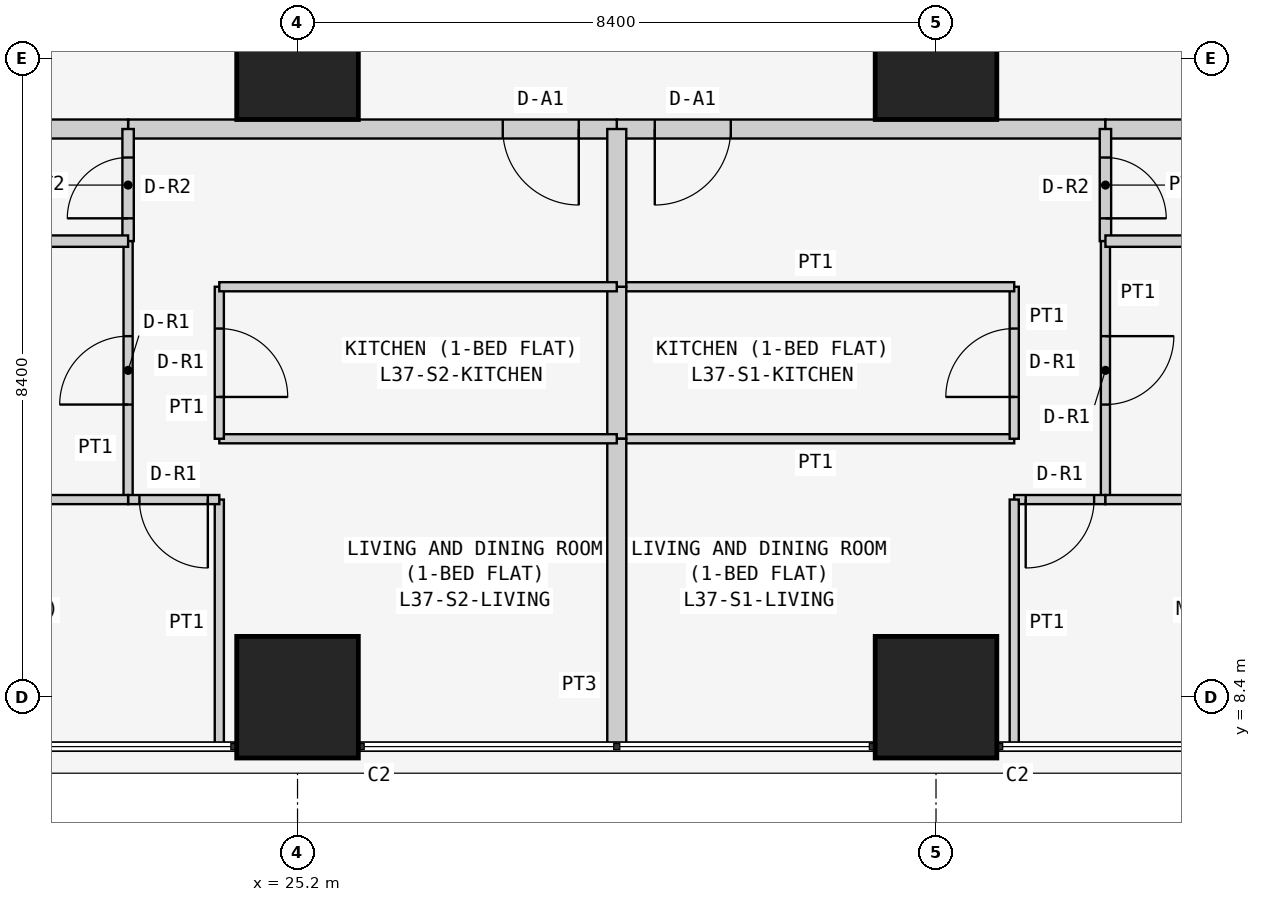
"""IFC4 building model, lengths in metres.
Left out: names, types, materials, properties, quantities, classifications, styles, units other than length and angle.
Written with IfcOpenShell. Run it as: python <this file> out.ifc"""

import sys

from ifc_helpers import new_model, si_unit, direction, frame, frame_2d, origin, origin_2d, place, context, subcontext, project, spatial, rectangle, extrude, element, fill, save


model = new_model("IFC4")
c1 = context("Model", 3, precision=1e-05, world=origin(), true_north=direction((0.0, 1.0)))
c2 = subcontext(c1, "Body", "Model", "MODEL_VIEW")
j1 = project(units=[si_unit("LENGTHUNIT", "METRE"), si_unit("PLANEANGLEUNIT", "RADIAN")], contexts=[c1])
p1 = place(None, origin())
s1 = spatial("IfcSite", under=j1, at=p1, CompositionType="ELEMENT")
p2 = place(p1, origin())
s2 = spatial("IfcBuilding", under=s1, at=p2, CompositionType="ELEMENT")
p3 = place(p2, frame((0.0, 0.0, 144.9)))
s3 = spatial("IfcBuildingStorey", under=s2, at=p3, CompositionType="ELEMENT", Elevation=144.9)
for number, where, z_axis, x_axis in (
    (1, (25.2, 8.4, 0.0), (0.0, 0.0, 1.0), (1.0, 0.0, 0.0)),
    (2, (25.2, 16.8, 0.0), (0.0, 0.0, 1.0), (1.0, 0.0, 0.0)),
    (3, (33.6, 8.4, 0.0), (0.0, 0.0, 1.0), (1.0, 0.0, 0.0)),
    (4, (33.6, 16.8, 0.0), (0.0, 0.0, 1.0), (1.0, 0.0, 0.0)),
):
    element("IfcColumn", number, at=place(p3, frame(where, z_axis=z_axis, x_axis=x_axis)), inside=s3, PredefinedType="COLUMN", context=c2, shape_type="SweptSolid", body=[
        extrude(rectangle(XDim=1.6, YDim=1.6, at=origin_2d()), origin(), (0.0, 0.0, 1.0), 3.6),
    ])
p4 = place(p3, frame((35.829, 15.875, 0.0), z_axis=(0.0, 0.0, 1.0), x_axis=(-1.0, 0.0, 0.0)))
e5 = element("IfcWall", 5, at=p4, inside=s3, PredefinedType="PARTITIONING", context=c2, shape_type="SweptSolid", body=[
    extrude(rectangle(XDim=6.429, YDim=0.25, at=frame_2d((3.215, 0.0))), origin(), (0.0, 0.0, 1.0), 3.45),
])
p5 = place(p4, frame((4.929, 0.0, 0.0)))
e6 = element("IfcOpeningElement", 6, at=p5, cuts=e5, PredefinedType="OPENING", context=c2, shape_type="SweptSolid", body=[
    extrude(rectangle(XDim=1.0, YDim=2.1, at=frame_2d((0.5, 1.05))), frame((0.0, 0.135, 0.0), z_axis=(0.0, -1.0, 0.0), x_axis=(1.0, 0.0, 0.0)), (0.0, 0.0, 1.0), 0.27),
])
p6 = place(p3, frame((42.7, 15.875, 0.0), z_axis=(0.0, 0.0, 1.0), x_axis=(-1.0, 0.0, 0.0)))
e7 = element("IfcWall", 7, at=p6, inside=s3, PredefinedType="PARTITIONING", context=c2, shape_type="SweptSolid", body=[
    extrude(rectangle(XDim=6.871, YDim=0.25, at=frame_2d((3.436, 0.0))), origin(), (0.0, 0.0, 1.0), 3.45),
])
p7 = place(p3, frame((29.4, 15.875, 0.0), z_axis=(0.0, 0.0, 1.0), x_axis=(-1.0, 0.0, 0.0)))
e8 = element("IfcWall", 8, at=p7, inside=s3, PredefinedType="PARTITIONING", context=c2, shape_type="SweptSolid", body=[
    extrude(rectangle(XDim=6.429, YDim=0.25, at=frame_2d((3.214, 0.0))), origin(), (0.0, 0.0, 1.0), 3.45),
])
p8 = place(p7, frame((0.5, 0.0, 0.0)))
e9 = element("IfcOpeningElement", 9, at=p8, cuts=e8, PredefinedType="OPENING", context=c2, shape_type="SweptSolid", body=[
    extrude(rectangle(XDim=1.0, YDim=2.1, at=frame_2d((0.5, 1.05))), frame((0.0, 0.135, 0.0), z_axis=(0.0, -1.0, 0.0), x_axis=(1.0, 0.0, 0.0)), (0.0, 0.0, 1.0), 0.27),
])
p9 = place(p3, frame((22.971, 15.875, 0.0), z_axis=(0.0, 0.0, 1.0), x_axis=(-1.0, 0.0, 0.0)))
e10 = element("IfcWall", 10, at=p9, inside=s3, PredefinedType="PARTITIONING", context=c2, shape_type="SweptSolid", body=[
    extrude(rectangle(XDim=6.871, YDim=0.25, at=frame_2d((3.436, 0.0))), origin(), (0.0, 0.0, 1.0), 3.45),
])
p10 = place(p3, frame((29.4, 11.8, 0.0), z_axis=(0.0, 0.0, 1.0), x_axis=(1.0, 0.0, 0.0)))
e11 = element("IfcWall", 11, at=p10, inside=s3, PredefinedType="PARTITIONING", context=c2, shape_type="SweptSolid", body=[
    extrude(rectangle(XDim=5.229, YDim=0.12, at=frame_2d((2.615, 0.0))), origin(), (0.0, 0.0, 1.0), 3.45),
])
p11 = place(p3, frame((34.629, 11.8, 0.0), z_axis=(0.0, 0.0, 1.0), x_axis=(0.0, 1.0, 0.0)))
e12 = element("IfcWall", 12, at=p11, inside=s3, PredefinedType="PARTITIONING", context=c2, shape_type="SweptSolid", body=[
    extrude(rectangle(XDim=2.0, YDim=0.12, at=frame_2d((1.0, 0.0))), origin(), (0.0, 0.0, 1.0), 3.45),
])
p12 = place(p11, frame((0.55, 0.0, 0.0)))
e13 = element("IfcOpeningElement", 13, at=p12, cuts=e12, PredefinedType="OPENING", context=c2, shape_type="SweptSolid", body=[
    extrude(rectangle(XDim=0.9, YDim=2.1, at=frame_2d((0.45, 1.05))), frame((0.0, 0.07, 0.0), z_axis=(0.0, -1.0, 0.0), x_axis=(1.0, 0.0, 0.0)), (0.0, 0.0, 1.0), 0.14),
])
p13 = place(p3, frame((34.629, 13.8, 0.0), z_axis=(0.0, 0.0, 1.0), x_axis=(-1.0, 0.0, 0.0)))
e14 = element("IfcWall", 14, at=p13, inside=s3, PredefinedType="PARTITIONING", context=c2, shape_type="SweptSolid", body=[
    extrude(rectangle(XDim=5.229, YDim=0.12, at=frame_2d((2.615, 0.0))), origin(), (0.0, 0.0, 1.0), 3.45),
])
p14 = place(p3, frame((29.4, 13.8, 0.0), z_axis=(0.0, 0.0, 1.0), x_axis=(0.0, -1.0, 0.0)))
e15 = element("IfcWall", 15, at=p14, inside=s3, PredefinedType="PARTITIONING", context=c2, shape_type="SweptSolid", body=[
    extrude(rectangle(XDim=2.0, YDim=0.25, at=frame_2d((1.0, 0.0))), origin(), (0.0, 0.0, 1.0), 2.848),
])
p15 = place(p3, frame((35.829, 15.875, 0.0), z_axis=(0.0, 0.0, 1.0), x_axis=(0.0, -1.0, 0.0)))
e16 = element("IfcWall", 16, at=p15, inside=s3, PredefinedType="PARTITIONING", context=c2, shape_type="SweptSolid", body=[
    extrude(rectangle(XDim=1.475, YDim=0.15, at=frame_2d((0.738, 0.0))), origin(), (0.0, 0.0, 1.0), 3.45),
])
p16 = place(p15, frame((0.375, 0.0, 0.0)))
e17 = element("IfcOpeningElement", 17, at=p16, cuts=e16, PredefinedType="OPENING", context=c2, shape_type="SweptSolid", body=[
    extrude(rectangle(XDim=0.8, YDim=2.1, at=frame_2d((0.4, 1.05))), frame((0.0, 0.085, 0.0), z_axis=(0.0, -1.0, 0.0), x_axis=(1.0, 0.0, 0.0)), (0.0, 0.0, 1.0), 0.17),
])
p17 = place(p3, frame((35.829, 14.4, 0.0), z_axis=(0.0, 0.0, 1.0), x_axis=(0.0, -1.0, 0.0)))
e18 = element("IfcWall", 18, at=p17, inside=s3, PredefinedType="PARTITIONING", context=c2, shape_type="SweptSolid", body=[
    extrude(rectangle(XDim=3.4, YDim=0.12, at=frame_2d((1.7, 0.0))), origin(), (0.0, 0.0, 1.0), 3.45),
])
p18 = place(p17, frame((1.25, 0.0, 0.0)))
e19 = element("IfcOpeningElement", 19, at=p18, cuts=e18, PredefinedType="OPENING", context=c2, shape_type="SweptSolid", body=[
    extrude(rectangle(XDim=0.9, YDim=2.1, at=frame_2d((0.45, 1.05))), frame((0.0, 0.07, 0.0), z_axis=(0.0, -1.0, 0.0), x_axis=(1.0, 0.0, 0.0)), (0.0, 0.0, 1.0), 0.14),
])
p19 = place(p3, frame((35.829, 11.0, 0.0), z_axis=(0.0, 0.0, 1.0), x_axis=(-1.0, 0.0, 0.0)))
e20 = element("IfcWall", 20, at=p19, inside=s3, PredefinedType="PARTITIONING", context=c2, shape_type="SweptSolid", body=[
    extrude(rectangle(XDim=1.2, YDim=0.12, at=frame_2d((0.6, 0.0))), origin(), (0.0, 0.0, 1.0), 3.45),
])
p20 = place(p19, frame((0.149, 0.0, 0.0)))
e21 = element("IfcOpeningElement", 21, at=p20, cuts=e20, PredefinedType="OPENING", context=c2, shape_type="SweptSolid", body=[
    extrude(rectangle(XDim=0.9, YDim=2.1, at=frame_2d((0.45, 1.05))), frame((0.0, 0.07, 0.0), z_axis=(0.0, -1.0, 0.0), x_axis=(1.0, 0.0, 0.0)), (0.0, 0.0, 1.0), 0.14),
])
p21 = place(p3, frame((34.629, 11.0, 0.0), z_axis=(0.0, 0.0, 1.0), x_axis=(0.0, -1.0, 0.0)))
e22 = element("IfcWall", 22, at=p21, inside=s3, PredefinedType="PARTITIONING", context=c2, shape_type="SweptSolid", body=[
    extrude(rectangle(XDim=3.25, YDim=0.12, at=frame_2d((1.625, 0.0))), origin(), (0.0, 0.0, 1.0), 3.45),
])
p22 = place(p3, frame((29.4, 7.75, 0.0), z_axis=(0.0, 0.0, 1.0), x_axis=(0.0, 1.0, 0.0)))
e23 = element("IfcWall", 23, at=p22, inside=s3, PredefinedType="PARTITIONING", context=c2, shape_type="SweptSolid", body=[
    extrude(rectangle(XDim=4.05, YDim=0.25, at=frame_2d((2.025, 0.0))), origin(), (0.0, 0.0, 1.0), 2.848),
])
p23 = place(p3, frame((29.4, 13.8, 0.0), z_axis=(0.0, 0.0, 1.0), x_axis=(0.0, 1.0, 0.0)))
e24 = element("IfcWall", 24, at=p23, inside=s3, PredefinedType="PARTITIONING", context=c2, shape_type="SweptSolid", body=[
    extrude(rectangle(XDim=2.075, YDim=0.25, at=frame_2d((1.038, 0.0))), origin(), (0.0, 0.0, 1.0), 2.848),
])
p24 = place(p3, frame((35.829, 14.4, 0.0), z_axis=(0.0, 0.0, 1.0), x_axis=(1.0, 0.0, 0.0)))
e25 = element("IfcWall", 25, at=p24, inside=s3, PredefinedType="PARTITIONING", context=c2, shape_type="SweptSolid", body=[
    extrude(rectangle(XDim=6.871, YDim=0.15, at=frame_2d((3.436, 0.0))), origin(), (0.0, 0.0, 1.0), 3.45),
])
p25 = place(p3, frame((35.829, 11.0, 0.0), z_axis=(0.0, 0.0, 1.0), x_axis=(1.0, 0.0, 0.0)))
e26 = element("IfcWall", 26, at=p25, inside=s3, PredefinedType="PARTITIONING", context=c2, shape_type="SweptSolid", body=[
    extrude(rectangle(XDim=6.871, YDim=0.12, at=frame_2d((3.436, 0.0))), origin(), (0.0, 0.0, 1.0), 3.45),
])
p26 = place(p3, frame((29.4, 11.8, 0.0), z_axis=(0.0, 0.0, 1.0), x_axis=(-1.0, 0.0, 0.0)))
e27 = element("IfcWall", 27, at=p26, inside=s3, PredefinedType="PARTITIONING", context=c2, shape_type="SweptSolid", body=[
    extrude(rectangle(XDim=5.229, YDim=0.12, at=frame_2d((2.615, 0.0))), origin(), (0.0, 0.0, 1.0), 3.45),
])
p27 = place(p3, frame((24.171, 11.8, 0.0), z_axis=(0.0, 0.0, 1.0), x_axis=(0.0, 1.0, 0.0)))
e28 = element("IfcWall", 28, at=p27, inside=s3, PredefinedType="PARTITIONING", context=c2, shape_type="SweptSolid", body=[
    extrude(rectangle(XDim=2.0, YDim=0.12, at=frame_2d((1.0, 0.0))), origin(), (0.0, 0.0, 1.0), 3.45),
])
p28 = place(p27, frame((0.55, 0.0, 0.0)))
e29 = element("IfcOpeningElement", 29, at=p28, cuts=e28, PredefinedType="OPENING", context=c2, shape_type="SweptSolid", body=[
    extrude(rectangle(XDim=0.9, YDim=2.1, at=frame_2d((0.45, 1.05))), frame((0.0, 0.07, 0.0), z_axis=(0.0, -1.0, 0.0), x_axis=(1.0, 0.0, 0.0)), (0.0, 0.0, 1.0), 0.14),
])
p29 = place(p3, frame((24.171, 13.8, 0.0), z_axis=(0.0, 0.0, 1.0), x_axis=(1.0, 0.0, 0.0)))
e30 = element("IfcWall", 30, at=p29, inside=s3, PredefinedType="PARTITIONING", context=c2, shape_type="SweptSolid", body=[
    extrude(rectangle(XDim=5.229, YDim=0.12, at=frame_2d((2.615, 0.0))), origin(), (0.0, 0.0, 1.0), 3.45),
])
p30 = place(p3, frame((22.971, 14.4, 0.0), z_axis=(0.0, 0.0, 1.0), x_axis=(0.0, 1.0, 0.0)))
e31 = element("IfcWall", 31, at=p30, inside=s3, PredefinedType="PARTITIONING", context=c2, shape_type="SweptSolid", body=[
    extrude(rectangle(XDim=1.475, YDim=0.15, at=frame_2d((0.738, 0.0))), origin(), (0.0, 0.0, 1.0), 3.45),
])
p31 = place(p30, frame((0.3, 0.0, 0.0)))
e32 = element("IfcOpeningElement", 32, at=p31, cuts=e31, PredefinedType="OPENING", context=c2, shape_type="SweptSolid", body=[
    extrude(rectangle(XDim=0.8, YDim=2.1, at=frame_2d((0.4, 1.05))), frame((0.0, 0.085, 0.0), z_axis=(0.0, -1.0, 0.0), x_axis=(1.0, 0.0, 0.0)), (0.0, 0.0, 1.0), 0.17),
])
p32 = place(p3, frame((22.971, 11.0, 0.0), z_axis=(0.0, 0.0, 1.0), x_axis=(0.0, 1.0, 0.0)))
e33 = element("IfcWall", 33, at=p32, inside=s3, PredefinedType="PARTITIONING", context=c2, shape_type="SweptSolid", body=[
    extrude(rectangle(XDim=3.4, YDim=0.12, at=frame_2d((1.7, 0.0))), origin(), (0.0, 0.0, 1.0), 3.45),
])
p33 = place(p32, frame((1.25, 0.0, 0.0)))
e34 = element("IfcOpeningElement", 34, at=p33, cuts=e33, PredefinedType="OPENING", context=c2, shape_type="SweptSolid", body=[
    extrude(rectangle(XDim=0.9, YDim=2.1, at=frame_2d((0.45, 1.05))), frame((0.0, 0.07, 0.0), z_axis=(0.0, -1.0, 0.0), x_axis=(1.0, 0.0, 0.0)), (0.0, 0.0, 1.0), 0.14),
])
p34 = place(p3, frame((24.171, 7.75, 0.0), z_axis=(0.0, 0.0, 1.0), x_axis=(0.0, 1.0, 0.0)))
e35 = element("IfcWall", 35, at=p34, inside=s3, PredefinedType="PARTITIONING", context=c2, shape_type="SweptSolid", body=[
    extrude(rectangle(XDim=3.25, YDim=0.12, at=frame_2d((1.625, 0.0))), origin(), (0.0, 0.0, 1.0), 3.45),
])
p35 = place(p3, frame((24.171, 11.0, 0.0), z_axis=(0.0, 0.0, 1.0), x_axis=(-1.0, 0.0, 0.0)))
e36 = element("IfcWall", 36, at=p35, inside=s3, PredefinedType="PARTITIONING", context=c2, shape_type="SweptSolid", body=[
    extrude(rectangle(XDim=1.2, YDim=0.12, at=frame_2d((0.6, 0.0))), origin(), (0.0, 0.0, 1.0), 3.45),
])
p36 = place(p35, frame((0.151, 0.0, 0.0)))
e37 = element("IfcOpeningElement", 37, at=p36, cuts=e36, PredefinedType="OPENING", context=c2, shape_type="SweptSolid", body=[
    extrude(rectangle(XDim=0.9, YDim=2.1, at=frame_2d((0.45, 1.05))), frame((0.0, 0.07, 0.0), z_axis=(0.0, -1.0, 0.0), x_axis=(1.0, 0.0, 0.0)), (0.0, 0.0, 1.0), 0.14),
])
p37 = place(p3, frame((22.971, 14.4, 0.0), z_axis=(0.0, 0.0, 1.0), x_axis=(-1.0, 0.0, 0.0)))
e38 = element("IfcWall", 38, at=p37, inside=s3, PredefinedType="PARTITIONING", context=c2, shape_type="SweptSolid", body=[
    extrude(rectangle(XDim=6.871, YDim=0.15, at=frame_2d((3.436, 0.0))), origin(), (0.0, 0.0, 1.0), 3.45),
])
p38 = place(p3, frame((22.971, 11.0, 0.0), z_axis=(0.0, 0.0, 1.0), x_axis=(-1.0, 0.0, 0.0)))
e39 = element("IfcWall", 39, at=p38, inside=s3, PredefinedType="PARTITIONING", context=c2, shape_type="SweptSolid", body=[
    extrude(rectangle(XDim=6.871, YDim=0.12, at=frame_2d((3.436, 0.0))), origin(), (0.0, 0.0, 1.0), 3.45),
])
p39 = place(p5, origin())
e40 = element("IfcDoor", 40, at=p39, inside=s3, OperationType="SINGLE_SWING_RIGHT", PredefinedType="DOOR", context=c2, shape_type="SweptSolid", body=[
    extrude(rectangle(XDim=1.0, YDim=2.1, at=frame_2d((0.5, 1.05))), frame((0.0, 0.025, 0.0), z_axis=(0.0, -1.0, 0.0), x_axis=(1.0, 0.0, 0.0)), (0.0, 0.0, 1.0), 0.05),
])
fill(e6, e40)
p40 = place(p12, origin())
e41 = element("IfcDoor", 41, at=p40, inside=s3, OperationType="SINGLE_SWING_LEFT", PredefinedType="DOOR", context=c2, shape_type="SweptSolid", body=[
    extrude(rectangle(XDim=0.9, YDim=2.1, at=frame_2d((0.45, 1.05))), frame((0.0, 0.025, 0.0), z_axis=(0.0, -1.0, 0.0), x_axis=(1.0, 0.0, 0.0)), (0.0, 0.0, 1.0), 0.05),
])
fill(e13, e41)
p41 = place(p16, origin())
e42 = element("IfcDoor", 42, at=p41, inside=s3, OperationType="SINGLE_SWING_RIGHT", PredefinedType="DOOR", context=c2, shape_type="SweptSolid", body=[
    extrude(rectangle(XDim=0.8, YDim=2.1, at=frame_2d((0.4, 1.05))), frame((0.0, 0.025, 0.0), z_axis=(0.0, -1.0, 0.0), x_axis=(1.0, 0.0, 0.0)), (0.0, 0.0, 1.0), 0.05),
])
fill(e17, e42)
p42 = place(p18, origin())
e43 = element("IfcDoor", 43, at=p42, inside=s3, OperationType="SINGLE_SWING_LEFT", PredefinedType="DOOR", context=c2, shape_type="SweptSolid", body=[
    extrude(rectangle(XDim=0.9, YDim=2.1, at=frame_2d((0.45, 1.05))), frame((0.0, 0.025, 0.0), z_axis=(0.0, -1.0, 0.0), x_axis=(1.0, 0.0, 0.0)), (0.0, 0.0, 1.0), 0.05),
])
fill(e19, e43)
p43 = place(p20, origin())
e44 = element("IfcDoor", 44, at=p43, inside=s3, OperationType="SINGLE_SWING_RIGHT", PredefinedType="DOOR", context=c2, shape_type="SweptSolid", body=[
    extrude(rectangle(XDim=0.9, YDim=2.1, at=frame_2d((0.45, 1.05))), frame((0.0, 0.025, 0.0), z_axis=(0.0, -1.0, 0.0), x_axis=(1.0, 0.0, 0.0)), (0.0, 0.0, 1.0), 0.05),
])
fill(e21, e44)
p44 = place(p8, origin())
e45 = element("IfcDoor", 45, at=p44, inside=s3, OperationType="SINGLE_SWING_LEFT", PredefinedType="DOOR", context=c2, shape_type="SweptSolid", body=[
    extrude(rectangle(XDim=1.0, YDim=2.1, at=frame_2d((0.5, 1.05))), frame((0.0, 0.025, 0.0), z_axis=(0.0, -1.0, 0.0), x_axis=(1.0, 0.0, 0.0)), (0.0, 0.0, 1.0), 0.05),
])
fill(e9, e45)
p45 = place(p28, frame((0.9, 0.0, 0.0), z_axis=(0.0, 0.0, 1.0), x_axis=(-1.0, 0.0, 0.0)))
e46 = element("IfcDoor", 46, at=p45, inside=s3, OperationType="SINGLE_SWING_RIGHT", PredefinedType="DOOR", context=c2, shape_type="SweptSolid", body=[
    extrude(rectangle(XDim=0.9, YDim=2.1, at=frame_2d((0.45, 1.05))), frame((0.0, 0.025, 0.0), z_axis=(0.0, -1.0, 0.0), x_axis=(1.0, 0.0, 0.0)), (0.0, 0.0, 1.0), 0.05),
])
fill(e29, e46)
p46 = place(p31, origin())
e47 = element("IfcDoor", 47, at=p46, inside=s3, OperationType="SINGLE_SWING_LEFT", PredefinedType="DOOR", context=c2, shape_type="SweptSolid", body=[
    extrude(rectangle(XDim=0.8, YDim=2.1, at=frame_2d((0.4, 1.05))), frame((0.0, 0.025, 0.0), z_axis=(0.0, -1.0, 0.0), x_axis=(1.0, 0.0, 0.0)), (0.0, 0.0, 1.0), 0.05),
])
fill(e32, e47)
p47 = place(p33, origin())
e48 = element("IfcDoor", 48, at=p47, inside=s3, OperationType="SINGLE_SWING_LEFT", PredefinedType="DOOR", context=c2, shape_type="SweptSolid", body=[
    extrude(rectangle(XDim=0.9, YDim=2.1, at=frame_2d((0.45, 1.05))), frame((0.0, 0.025, 0.0), z_axis=(0.0, -1.0, 0.0), x_axis=(1.0, 0.0, 0.0)), (0.0, 0.0, 1.0), 0.05),
])
fill(e34, e48)
p48 = place(p36, origin())
e49 = element("IfcDoor", 49, at=p48, inside=s3, OperationType="SINGLE_SWING_LEFT", PredefinedType="DOOR", context=c2, shape_type="SweptSolid", body=[
    extrude(rectangle(XDim=0.9, YDim=2.1, at=frame_2d((0.45, 1.05))), frame((0.0, 0.025, 0.0), z_axis=(0.0, -1.0, 0.0), x_axis=(1.0, 0.0, 0.0)), (0.0, 0.0, 1.0), 0.05),
])
fill(e37, e49)
save(model, sys.argv[1])
